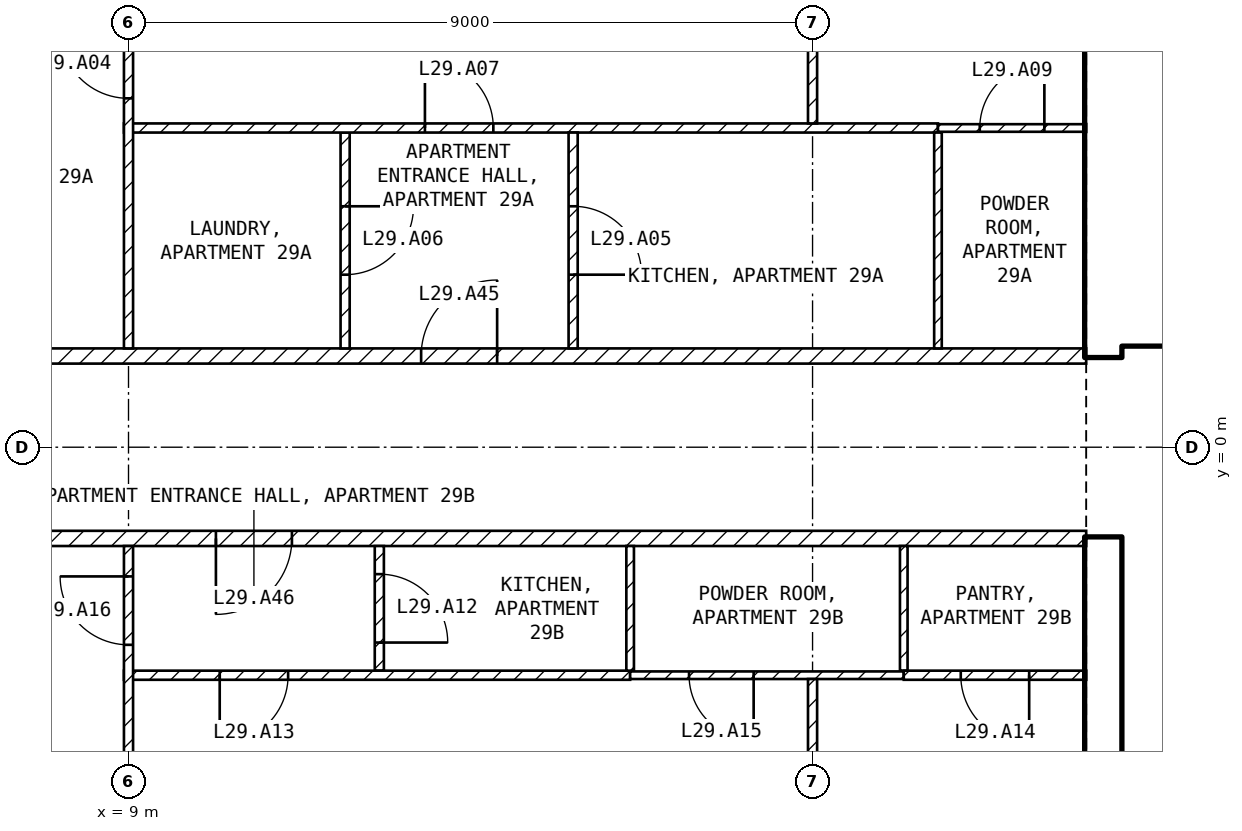
"""IFC4 building model, lengths in metres.
Left out: names, types, materials, properties, quantities, classifications, styles, units other than length and angle.
Written with IfcOpenShell. Run it as: python <this file> out.ifc"""

import sys

from ifc_helpers import new_model, si_unit, direction, frame, frame_2d, origin, place, context, subcontext, project, spatial, rectangle, extrude, element, fill, save


model = new_model("IFC4")
c1 = context("Model", 3, precision=1e-05, world=origin(), true_north=direction((0.0, 1.0)))
c2 = subcontext(c1, "Body", "Model", "MODEL_VIEW")
j1 = project(units=[si_unit("LENGTHUNIT", "METRE"), si_unit("PLANEANGLEUNIT", "RADIAN")], contexts=[c1])
p1 = place(None, origin())
s1 = spatial("IfcSite", under=j1, at=p1, CompositionType="ELEMENT")
p2 = place(p1, origin())
s2 = spatial("IfcBuilding", under=s1, at=p2, CompositionType="ELEMENT")
p3 = place(p2, frame((0.0, 0.0, 123.4)))
s3 = spatial("IfcBuildingStorey", under=s2, at=p3, CompositionType="ELEMENT", Elevation=123.4)
for number, where, z_axis, x_axis in (
    (1, (21.825, -8.1, 0.0), (0.0, 0.0, 1.0), (0.0, 1.0, 0.0)),
    (2, (21.825, 1.2, 0.0), (0.0, 0.0, 1.0), (0.0, 1.0, 0.0)),
):
    element("IfcWall", number, at=place(p3, frame(where, z_axis=z_axis, x_axis=x_axis)), inside=s3, PredefinedType="SHEAR", context=c2, shape_type="SweptSolid", body=[
        extrude(rectangle(XDim=6.9, YDim=0.45, at=frame_2d((3.45, 0.0))), origin(), (0.0, 0.0, 1.0), 3.25),
    ])
p4 = place(p3, frame((22.05, 1.45, 0.0), z_axis=(0.0, 0.0, 1.0), x_axis=(1.0, 0.0, 0.0)))
e3 = element("IfcWall", 3, at=p4, inside=s3, PredefinedType="SOLIDWALL", context=c2, shape_type="SweptSolid", body=[
    extrude(rectangle(XDim=11.0, YDim=0.2, at=frame_2d((5.5, 0.0))), origin(), (0.0, 0.0, 1.0), 3.25),
])
p5 = place(p4, frame((0.75, 0.0, 0.0)))
e4 = element("IfcOpeningElement", 4, at=p5, cuts=e3, PredefinedType="OPENING", context=c2, shape_type="SweptSolid", body=[
    extrude(rectangle(XDim=1.0, YDim=2.1, at=frame_2d((0.5, 1.05))), frame((0.0, 0.11, 0.0), z_axis=(0.0, -1.0, 0.0), x_axis=(1.0, 0.0, 0.0)), (0.0, 0.0, 1.0), 0.22),
])
p6 = place(p4, frame((3.25, 0.0, 0.0)))
e5 = element("IfcOpeningElement", 5, at=p6, cuts=e3, PredefinedType="OPENING", context=c2, shape_type="SweptSolid", body=[
    extrude(rectangle(XDim=1.0, YDim=2.1, at=frame_2d((0.5, 1.05))), frame((0.0, 0.11, 0.0), z_axis=(0.0, -1.0, 0.0), x_axis=(1.0, 0.0, 0.0)), (0.0, 0.0, 1.0), 0.22),
])
p7 = place(p4, frame((9.075, 0.0, 0.0)))
e6 = element("IfcOpeningElement", 6, at=p7, cuts=e3, PredefinedType="OPENING", context=c2, shape_type="SweptSolid", body=[
    extrude(rectangle(XDim=0.9, YDim=2.1, at=frame_2d((0.45, 1.05))), frame((0.0, 0.11, 0.0), z_axis=(0.0, -1.0, 0.0), x_axis=(1.0, 0.0, 0.0)), (0.0, 0.0, 1.0), 0.22),
])
p8 = place(p3, frame((22.05, 5.15, 0.0), z_axis=(0.0, 0.0, 1.0), x_axis=(1.0, 0.0, 0.0)))
e7 = element("IfcWall", 7, at=p8, inside=s3, PredefinedType="SOLIDWALL", context=c2, shape_type="SweptSolid", body=[
    extrude(rectangle(XDim=6.3, YDim=0.2, at=frame_2d((3.15, 0.0))), origin(), (0.0, 0.0, 1.0), 3.25),
])
p9 = place(p8, frame((0.2, 0.0, 0.0)))
e8 = element("IfcOpeningElement", 8, at=p9, cuts=e7, PredefinedType="OPENING", context=c2, shape_type="SweptSolid", body=[
    extrude(rectangle(XDim=1.0, YDim=2.1, at=frame_2d((0.5, 1.05))), frame((0.0, 0.11, 0.0), z_axis=(0.0, -1.0, 0.0), x_axis=(1.0, 0.0, 0.0)), (0.0, 0.0, 1.0), 0.22),
])
p10 = place(p3, frame((4.4, 1.2, 0.0), z_axis=(0.0, 0.0, 1.0), x_axis=(1.0, 0.0, 0.0)))
e9 = element("IfcWall", 9, at=p10, inside=s3, PredefinedType="PARTITIONING", context=c2, shape_type="SweptSolid", body=[
    extrude(rectangle(XDim=17.2, YDim=0.2, at=frame_2d((8.6, 0.0))), origin(), (0.0, 0.0, 1.0), 3.25),
])
p11 = place(p10, frame((8.45, 0.0, 0.0)))
e10 = element("IfcOpeningElement", 10, at=p11, cuts=e9, PredefinedType="OPENING", context=c2, shape_type="SweptSolid", body=[
    extrude(rectangle(XDim=1.0, YDim=2.1, at=frame_2d((0.5, 1.05))), frame((0.0, 0.11, 0.0), z_axis=(0.0, -1.0, 0.0), x_axis=(1.0, 0.0, 0.0)), (0.0, 0.0, 1.0), 0.22),
])
p12 = place(p3, frame((21.6, -1.2, 0.0), z_axis=(0.0, 0.0, 1.0), x_axis=(-1.0, 0.0, 0.0)))
e11 = element("IfcWall", 11, at=p12, inside=s3, PredefinedType="PARTITIONING", context=c2, shape_type="SweptSolid", body=[
    extrude(rectangle(XDim=17.2, YDim=0.2, at=frame_2d((8.6, 0.0))), origin(), (0.0, 0.0, 1.0), 3.25),
])
p13 = place(p12, frame((10.45, 0.0, 0.0)))
e12 = element("IfcOpeningElement", 12, at=p13, cuts=e11, PredefinedType="OPENING", context=c2, shape_type="SweptSolid", body=[
    extrude(rectangle(XDim=1.0, YDim=2.1, at=frame_2d((0.5, 1.05))), frame((0.0, 0.11, 0.0), z_axis=(0.0, -1.0, 0.0), x_axis=(1.0, 0.0, 0.0)), (0.0, 0.0, 1.0), 0.22),
])
p14 = place(p3, frame((11.85, 4.14, 0.0), z_axis=(0.0, 0.0, 1.0), x_axis=(0.0, -1.0, 0.0)))
e13 = element("IfcWall", 13, at=p14, inside=s3, PredefinedType="PARTITIONING", context=c2, shape_type="SweptSolid", body=[
    extrude(rectangle(XDim=2.84, YDim=0.12, at=frame_2d((1.42, 0.0))), origin(), (0.0, 0.0, 1.0), 3.25),
])
p15 = place(p14, frame((0.97, 0.0, 0.0)))
e14 = element("IfcOpeningElement", 14, at=p15, cuts=e13, PredefinedType="OPENING", context=c2, shape_type="SweptSolid", body=[
    extrude(rectangle(XDim=0.9, YDim=2.1, at=frame_2d((0.45, 1.05))), frame((0.0, 0.07, 0.0), z_axis=(0.0, -1.0, 0.0), x_axis=(1.0, 0.0, 0.0)), (0.0, 0.0, 1.0), 0.14),
])
p16 = place(p3, frame((8.94, 4.2, 0.0), z_axis=(0.0, 0.0, 1.0), x_axis=(1.0, 0.0, 0.0)))
e15 = element("IfcWall", 15, at=p16, inside=s3, PredefinedType="PARTITIONING", context=c2, shape_type="SweptSolid", body=[
    extrude(rectangle(XDim=10.71, YDim=0.12, at=frame_2d((5.355, 0.0))), origin(), (0.0, 0.0, 1.0), 3.25),
])
p17 = place(p16, frame((3.96, 0.0, 0.0)))
e16 = element("IfcOpeningElement", 16, at=p17, cuts=e15, PredefinedType="OPENING", context=c2, shape_type="SweptSolid", body=[
    extrude(rectangle(XDim=0.9, YDim=2.1, at=frame_2d((0.45, 1.05))), frame((0.0, 0.07, 0.0), z_axis=(0.0, -1.0, 0.0), x_axis=(1.0, 0.0, 0.0)), (0.0, 0.0, 1.0), 0.14),
])
p18 = place(p3, frame((9.0, 1.3, 0.0), z_axis=(0.0, 0.0, 1.0), x_axis=(0.0, 1.0, 0.0)))
e17 = element("IfcWall", 17, at=p18, inside=s3, PredefinedType="PARTITIONING", context=c2, shape_type="SweptSolid", body=[
    extrude(rectangle(XDim=7.62, YDim=0.12, at=frame_2d((3.81, 0.0))), origin(), (0.0, 0.0, 1.0), 3.25),
])
p19 = place(p18, frame((3.29, 0.0, 0.0)))
e18 = element("IfcOpeningElement", 18, at=p19, cuts=e17, PredefinedType="OPENING", context=c2, shape_type="SweptSolid", body=[
    extrude(rectangle(XDim=0.9, YDim=2.1, at=frame_2d((0.45, 1.05))), frame((0.0, 0.07, 0.0), z_axis=(0.0, -1.0, 0.0), x_axis=(1.0, 0.0, 0.0)), (0.0, 0.0, 1.0), 0.14),
])
p20 = place(p18, frame((4.65, 0.0, 0.0)))
e19 = element("IfcOpeningElement", 19, at=p20, cuts=e17, PredefinedType="OPENING", context=c2, shape_type="SweptSolid", body=[
    extrude(rectangle(XDim=0.9, YDim=2.1, at=frame_2d((0.45, 1.05))), frame((0.0, 0.07, 0.0), z_axis=(0.0, -1.0, 0.0), x_axis=(1.0, 0.0, 0.0)), (0.0, 0.0, 1.0), 0.14),
])
p21 = place(p3, frame((14.85, 4.14, 0.0), z_axis=(0.0, 0.0, 1.0), x_axis=(0.0, -1.0, 0.0)))
e20 = element("IfcWall", 20, at=p21, inside=s3, PredefinedType="PARTITIONING", context=c2, shape_type="SweptSolid", body=[
    extrude(rectangle(XDim=2.84, YDim=0.12, at=frame_2d((1.42, 0.0))), origin(), (0.0, 0.0, 1.0), 3.25),
])
p22 = place(p21, frame((0.97, 0.0, 0.0)))
e21 = element("IfcOpeningElement", 21, at=p22, cuts=e20, PredefinedType="OPENING", context=c2, shape_type="SweptSolid", body=[
    extrude(rectangle(XDim=0.9, YDim=2.1, at=frame_2d((0.45, 1.05))), frame((0.0, 0.07, 0.0), z_axis=(0.0, -1.0, 0.0), x_axis=(1.0, 0.0, 0.0)), (0.0, 0.0, 1.0), 0.14),
])
p23 = place(p3, frame((19.65, 4.14, 0.0), z_axis=(0.0, 0.0, 1.0), x_axis=(0.0, -1.0, 0.0)))
e22 = element("IfcWall", 22, at=p23, inside=s3, PredefinedType="PARTITIONING", context=c2, shape_type="SweptSolid", body=[
    extrude(rectangle(XDim=2.84, YDim=0.1, at=frame_2d((1.42, 0.0))), origin(), (0.0, 0.0, 1.0), 3.25),
])
p24 = place(p3, frame((19.65, 4.2, 0.0), z_axis=(0.0, 0.0, 1.0), x_axis=(1.0, 0.0, 0.0)))
e23 = element("IfcWall", 23, at=p24, inside=s3, PredefinedType="PARTITIONING", context=c2, shape_type="SweptSolid", body=[
    extrude(rectangle(XDim=1.95, YDim=0.1, at=frame_2d((0.975, 0.0))), origin(), (0.0, 0.0, 1.0), 3.25),
])
p25 = place(p24, frame((0.55, 0.0, 0.0)))
e24 = element("IfcOpeningElement", 24, at=p25, cuts=e23, PredefinedType="OPENING", context=c2, shape_type="SweptSolid", body=[
    extrude(rectangle(XDim=0.85, YDim=2.1, at=frame_2d((0.425, 1.05))), frame((0.0, 0.06, 0.0), z_axis=(0.0, -1.0, 0.0), x_axis=(1.0, 0.0, 0.0)), (0.0, 0.0, 1.0), 0.12),
])
p26 = place(p3, frame((18.0, 8.92, 0.0), z_axis=(0.0, 0.0, 1.0), x_axis=(0.0, -1.0, 0.0)))
e25 = element("IfcWall", 25, at=p26, inside=s3, PredefinedType="PARTITIONING", context=c2, shape_type="SweptSolid", body=[
    extrude(rectangle(XDim=4.66, YDim=0.12, at=frame_2d((2.33, 0.0))), origin(), (0.0, 0.0, 1.0), 2.414),
])
p27 = place(p26, frame((2.59, 0.0, 0.0)))
e26 = element("IfcOpeningElement", 26, at=p27, cuts=e25, PredefinedType="OPENING", context=c2, shape_type="SweptSolid", body=[
    extrude(rectangle(XDim=0.9, YDim=2.1, at=frame_2d((0.45, 1.05))), frame((0.0, 0.07, 0.0), z_axis=(0.0, -1.0, 0.0), x_axis=(1.0, 0.0, 0.0)), (0.0, 0.0, 1.0), 0.14),
])
p28 = place(p3, frame((12.3, -1.3, 0.0), z_axis=(0.0, 0.0, 1.0), x_axis=(0.0, -1.0, 0.0)))
e27 = element("IfcWall", 27, at=p28, inside=s3, PredefinedType="PARTITIONING", context=c2, shape_type="SweptSolid", body=[
    extrude(rectangle(XDim=1.64, YDim=0.12, at=frame_2d((0.82, 0.0))), origin(), (0.0, 0.0, 1.0), 3.25),
])
p29 = place(p28, frame((0.37, 0.0, 0.0)))
e28 = element("IfcOpeningElement", 28, at=p29, cuts=e27, PredefinedType="OPENING", context=c2, shape_type="SweptSolid", body=[
    extrude(rectangle(XDim=0.9, YDim=2.1, at=frame_2d((0.45, 1.05))), frame((0.0, 0.07, 0.0), z_axis=(0.0, -1.0, 0.0), x_axis=(1.0, 0.0, 0.0)), (0.0, 0.0, 1.0), 0.14),
])
p30 = place(p3, frame((15.6, -3.0, 0.0), z_axis=(0.0, 0.0, 1.0), x_axis=(-1.0, 0.0, 0.0)))
e29 = element("IfcWall", 29, at=p30, inside=s3, PredefinedType="PARTITIONING", context=c2, shape_type="SweptSolid", body=[
    extrude(rectangle(XDim=6.66, YDim=0.12, at=frame_2d((3.33, 0.0))), origin(), (0.0, 0.0, 1.0), 3.25),
])
p31 = place(p30, frame((4.5, 0.0, 0.0)))
e30 = element("IfcOpeningElement", 30, at=p31, cuts=e29, PredefinedType="OPENING", context=c2, shape_type="SweptSolid", body=[
    extrude(rectangle(XDim=0.9, YDim=2.1, at=frame_2d((0.45, 1.05))), frame((0.0, 0.07, 0.0), z_axis=(0.0, -1.0, 0.0), x_axis=(1.0, 0.0, 0.0)), (0.0, 0.0, 1.0), 0.14),
])
p32 = place(p3, frame((9.0, -8.92, 0.0), z_axis=(0.0, 0.0, 1.0), x_axis=(0.0, 1.0, 0.0)))
e31 = element("IfcWall", 31, at=p32, inside=s3, PredefinedType="PARTITIONING", context=c2, shape_type="SweptSolid", body=[
    extrude(rectangle(XDim=7.62, YDim=0.12, at=frame_2d((3.81, 0.0))), origin(), (0.0, 0.0, 1.0), 3.25),
])
p33 = place(p32, frame((6.32, 0.0, 0.0)))
e32 = element("IfcOpeningElement", 32, at=p33, cuts=e31, PredefinedType="OPENING", context=c2, shape_type="SweptSolid", body=[
    extrude(rectangle(XDim=0.9, YDim=2.1, at=frame_2d((0.45, 1.05))), frame((0.0, 0.07, 0.0), z_axis=(0.0, -1.0, 0.0), x_axis=(1.0, 0.0, 0.0)), (0.0, 0.0, 1.0), 0.14),
])
for number, where, z_axis, x_axis in (
    (33, (15.6, -1.3, 0.0), (0.0, 0.0, 1.0), (0.0, -1.0, 0.0)),
    (34, (19.2, -1.3, 0.0), (0.0, 0.0, 1.0), (0.0, -1.0, 0.0)),
):
    element("IfcWall", number, at=place(p3, frame(where, z_axis=z_axis, x_axis=x_axis)), inside=s3, PredefinedType="PARTITIONING", context=c2, shape_type="SweptSolid", body=[
        extrude(rectangle(XDim=1.64, YDim=0.1, at=frame_2d((0.82, 0.0))), origin(), (0.0, 0.0, 1.0), 3.25),
    ])
p34 = place(p3, frame((19.2, -3.0, 0.0), z_axis=(0.0, 0.0, 1.0), x_axis=(-1.0, 0.0, 0.0)))
e35 = element("IfcWall", 35, at=p34, inside=s3, PredefinedType="PARTITIONING", context=c2, shape_type="SweptSolid", body=[
    extrude(rectangle(XDim=3.6, YDim=0.1, at=frame_2d((1.8, 0.0))), origin(), (0.0, 0.0, 1.0), 3.25),
])
p35 = place(p34, frame((1.975, 0.0, 0.0)))
e36 = element("IfcOpeningElement", 36, at=p35, cuts=e35, PredefinedType="OPENING", context=c2, shape_type="SweptSolid", body=[
    extrude(rectangle(XDim=0.85, YDim=2.1, at=frame_2d((0.425, 1.05))), frame((0.0, 0.06, 0.0), z_axis=(0.0, -1.0, 0.0), x_axis=(1.0, 0.0, 0.0)), (0.0, 0.0, 1.0), 0.12),
])
p36 = place(p3, frame((21.6, -3.0, 0.0), z_axis=(0.0, 0.0, 1.0), x_axis=(-1.0, 0.0, 0.0)))
e37 = element("IfcWall", 37, at=p36, inside=s3, PredefinedType="PARTITIONING", context=c2, shape_type="SweptSolid", body=[
    extrude(rectangle(XDim=2.4, YDim=0.12, at=frame_2d((1.2, 0.0))), origin(), (0.0, 0.0, 1.0), 3.25),
])
p37 = place(p36, frame((0.75, 0.0, 0.0)))
e38 = element("IfcOpeningElement", 38, at=p37, cuts=e37, PredefinedType="OPENING", context=c2, shape_type="SweptSolid", body=[
    extrude(rectangle(XDim=0.9, YDim=2.1, at=frame_2d((0.45, 1.05))), frame((0.0, 0.07, 0.0), z_axis=(0.0, -1.0, 0.0), x_axis=(1.0, 0.0, 0.0)), (0.0, 0.0, 1.0), 0.14),
])
p38 = place(p3, frame((18.0, -3.05, 0.0), z_axis=(0.0, 0.0, 1.0), x_axis=(0.0, -1.0, 0.0)))
e39 = element("IfcWall", 39, at=p38, inside=s3, PredefinedType="PARTITIONING", context=c2, shape_type="SweptSolid", body=[
    extrude(rectangle(XDim=5.87, YDim=0.12, at=frame_2d((2.935, 0.0))), origin(), (0.0, 0.0, 1.0), 2.414),
])
p39 = place(p38, frame((2.375, 0.0, 0.0)))
e40 = element("IfcOpeningElement", 40, at=p39, cuts=e39, PredefinedType="OPENING", context=c2, shape_type="SweptSolid", body=[
    extrude(rectangle(XDim=0.9, YDim=2.1, at=frame_2d((0.45, 1.05))), frame((0.0, 0.07, 0.0), z_axis=(0.0, -1.0, 0.0), x_axis=(1.0, 0.0, 0.0)), (0.0, 0.0, 1.0), 0.14),
])
p40 = place(p9, origin())
e41 = element("IfcDoor", 41, at=p40, inside=s3, OperationType="SINGLE_SWING_LEFT", PredefinedType="DOOR", context=c2, shape_type="SweptSolid", body=[
    extrude(rectangle(XDim=1.0, YDim=2.1, at=frame_2d((0.5, 1.05))), frame((0.0, 0.025, 0.0), z_axis=(0.0, -1.0, 0.0), x_axis=(1.0, 0.0, 0.0)), (0.0, 0.0, 1.0), 0.05),
])
fill(e8, e41)
p41 = place(p19, origin())
e42 = element("IfcDoor", 42, at=p41, inside=s3, OperationType="SINGLE_SWING_RIGHT", PredefinedType="DOOR", context=c2, shape_type="SweptSolid", body=[
    extrude(rectangle(XDim=0.9, YDim=2.1, at=frame_2d((0.45, 1.05))), frame((0.0, 0.025, 0.0), z_axis=(0.0, -1.0, 0.0), x_axis=(1.0, 0.0, 0.0)), (0.0, 0.0, 1.0), 0.05),
])
fill(e18, e42)
p42 = place(p22, origin())
e43 = element("IfcDoor", 43, at=p42, inside=s3, OperationType="SINGLE_SWING_RIGHT", PredefinedType="DOOR", context=c2, shape_type="SweptSolid", body=[
    extrude(rectangle(XDim=0.9, YDim=2.1, at=frame_2d((0.45, 1.05))), frame((0.0, 0.025, 0.0), z_axis=(0.0, -1.0, 0.0), x_axis=(1.0, 0.0, 0.0)), (0.0, 0.0, 1.0), 0.05),
])
fill(e21, e43)
p43 = place(p15, origin())
e44 = element("IfcDoor", 44, at=p43, inside=s3, OperationType="SINGLE_SWING_LEFT", PredefinedType="DOOR", context=c2, shape_type="SweptSolid", body=[
    extrude(rectangle(XDim=0.9, YDim=2.1, at=frame_2d((0.45, 1.05))), frame((0.0, 0.025, 0.0), z_axis=(0.0, -1.0, 0.0), x_axis=(1.0, 0.0, 0.0)), (0.0, 0.0, 1.0), 0.05),
])
fill(e14, e44)
p44 = place(p17, origin())
e45 = element("IfcDoor", 45, at=p44, inside=s3, OperationType="SINGLE_SWING_LEFT", PredefinedType="DOOR", context=c2, shape_type="SweptSolid", body=[
    extrude(rectangle(XDim=0.9, YDim=2.1, at=frame_2d((0.45, 1.05))), frame((0.0, 0.025, 0.0), z_axis=(0.0, -1.0, 0.0), x_axis=(1.0, 0.0, 0.0)), (0.0, 0.0, 1.0), 0.05),
])
fill(e16, e45)
p45 = place(p25, origin())
e46 = element("IfcDoor", 46, at=p45, inside=s3, OperationType="SINGLE_SWING_RIGHT", PredefinedType="DOOR", context=c2, shape_type="SweptSolid", body=[
    extrude(rectangle(XDim=0.85, YDim=2.1, at=frame_2d((0.425, 1.05))), frame((0.0, 0.025, 0.0), z_axis=(0.0, -1.0, 0.0), x_axis=(1.0, 0.0, 0.0)), (0.0, 0.0, 1.0), 0.05),
])
fill(e24, e46)
p46 = place(p29, origin())
e47 = element("IfcDoor", 47, at=p46, inside=s3, OperationType="SINGLE_SWING_RIGHT", PredefinedType="DOOR", context=c2, shape_type="SweptSolid", body=[
    extrude(rectangle(XDim=0.9, YDim=2.1, at=frame_2d((0.45, 1.05))), frame((0.0, 0.025, 0.0), z_axis=(0.0, -1.0, 0.0), x_axis=(1.0, 0.0, 0.0)), (0.0, 0.0, 1.0), 0.05),
])
fill(e28, e47)
p47 = place(p31, origin())
e48 = element("IfcDoor", 48, at=p47, inside=s3, OperationType="SINGLE_SWING_RIGHT", PredefinedType="DOOR", context=c2, shape_type="SweptSolid", body=[
    extrude(rectangle(XDim=0.9, YDim=2.1, at=frame_2d((0.45, 1.05))), frame((0.0, 0.025, 0.0), z_axis=(0.0, -1.0, 0.0), x_axis=(1.0, 0.0, 0.0)), (0.0, 0.0, 1.0), 0.05),
])
fill(e30, e48)
p48 = place(p37, origin())
e49 = element("IfcDoor", 49, at=p48, inside=s3, OperationType="SINGLE_SWING_LEFT", PredefinedType="DOOR", context=c2, shape_type="SweptSolid", body=[
    extrude(rectangle(XDim=0.9, YDim=2.1, at=frame_2d((0.45, 1.05))), frame((0.0, 0.025, 0.0), z_axis=(0.0, -1.0, 0.0), x_axis=(1.0, 0.0, 0.0)), (0.0, 0.0, 1.0), 0.05),
])
fill(e38, e49)
p49 = place(p35, origin())
e50 = element("IfcDoor", 50, at=p49, inside=s3, OperationType="SINGLE_SWING_LEFT", PredefinedType="DOOR", context=c2, shape_type="SweptSolid", body=[
    extrude(rectangle(XDim=0.85, YDim=2.1, at=frame_2d((0.425, 1.05))), frame((0.0, 0.025, 0.0), z_axis=(0.0, -1.0, 0.0), x_axis=(1.0, 0.0, 0.0)), (0.0, 0.0, 1.0), 0.05),
])
fill(e36, e50)
p50 = place(p33, origin())
e51 = element("IfcDoor", 51, at=p50, inside=s3, OperationType="SINGLE_SWING_RIGHT", PredefinedType="DOOR", context=c2, shape_type="SweptSolid", body=[
    extrude(rectangle(XDim=0.9, YDim=2.1, at=frame_2d((0.45, 1.05))), frame((0.0, 0.025, 0.0), z_axis=(0.0, -1.0, 0.0), x_axis=(1.0, 0.0, 0.0)), (0.0, 0.0, 1.0), 0.05),
])
fill(e32, e51)
p51 = place(p11, origin())
e52 = element("IfcDoor", 52, at=p51, inside=s3, OperationType="SINGLE_SWING_RIGHT", PredefinedType="DOOR", context=c2, shape_type="SweptSolid", body=[
    extrude(rectangle(XDim=1.0, YDim=2.1, at=frame_2d((0.5, 1.05))), frame((0.0, 0.025, 0.0), z_axis=(0.0, -1.0, 0.0), x_axis=(1.0, 0.0, 0.0)), (0.0, 0.0, 1.0), 0.05),
])
fill(e10, e52)
p52 = place(p13, origin())
e53 = element("IfcDoor", 53, at=p52, inside=s3, OperationType="SINGLE_SWING_RIGHT", PredefinedType="DOOR", context=c2, shape_type="SweptSolid", body=[
    extrude(rectangle(XDim=1.0, YDim=2.1, at=frame_2d((0.5, 1.05))), frame((0.0, 0.025, 0.0), z_axis=(0.0, -1.0, 0.0), x_axis=(1.0, 0.0, 0.0)), (0.0, 0.0, 1.0), 0.05),
])
fill(e12, e53)
save(model, sys.argv[1])
